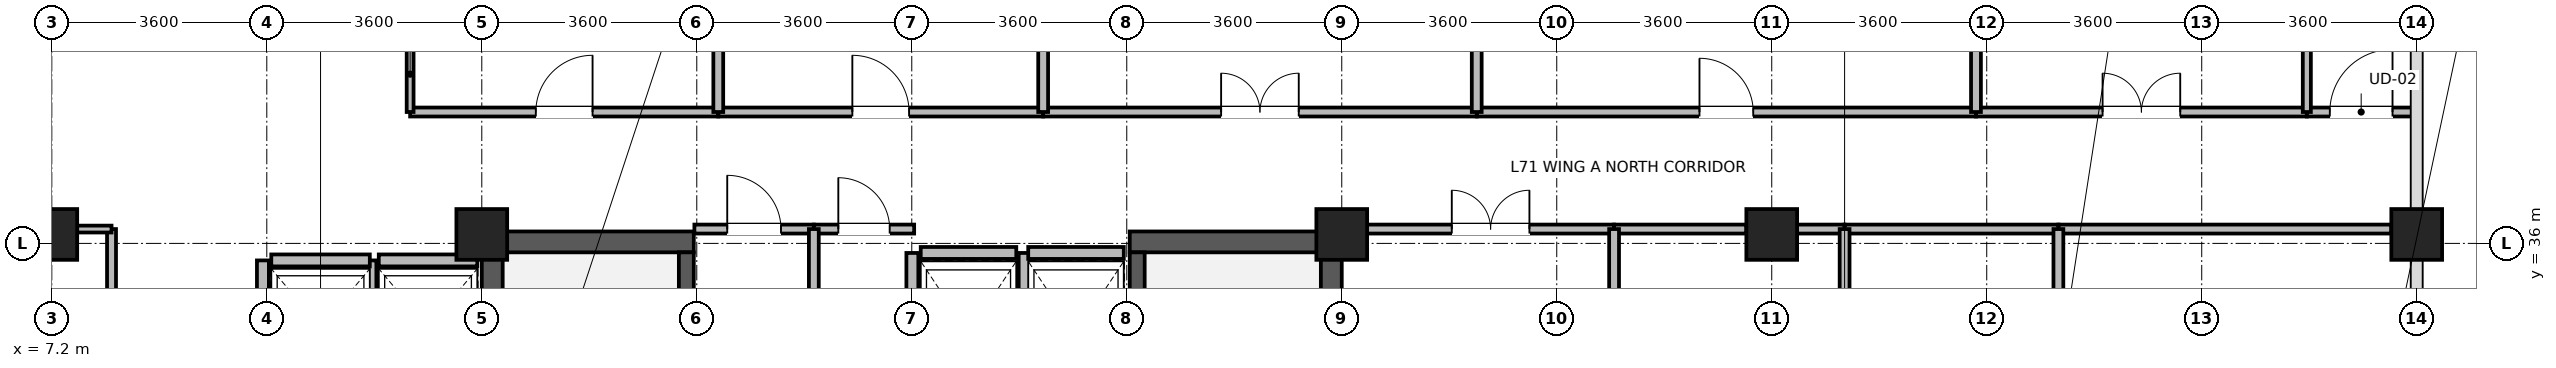
"""IFC4 building model, lengths in metres.
Left out: names, types, materials, properties, quantities, classifications, styles, units other than length and angle.
Written with IfcOpenShell. Run it as: python <this file> out.ifc"""

import sys

from ifc_helpers import new_model, si_unit, direction, frame, frame_2d, origin, origin_2d, place, context, subcontext, project, spatial, rectangle, extrude, source, transform, mapped, element, fill, save


model = new_model("IFC4")
c1 = context("Model", 3, precision=1e-05, world=origin(), true_north=direction((0.0, 1.0)))
c2 = subcontext(c1, "Body", "Model", "MODEL_VIEW")
j1 = project(units=[si_unit("LENGTHUNIT", "METRE"), si_unit("PLANEANGLEUNIT", "RADIAN")], contexts=[c1])
p1 = place(None, origin())
s1 = spatial("IfcSite", under=j1, at=p1, CompositionType="ELEMENT")
p2 = place(p1, origin())
s2 = spatial("IfcBuilding", under=s1, at=p2, CompositionType="ELEMENT")
p3 = place(p2, frame((0.0, 0.0, 275.8)))
s3 = spatial("IfcBuildingStorey", under=s2, at=p3, CompositionType="ELEMENT", Elevation=275.8)
for number, where, z_axis, x_axis in (
    (1, (14.575, 28.5, 0.0), (0.0, 0.0, 1.0), (0.0, 1.0, 0.0)),
    (2, (28.625, 28.5, 0.0), (0.0, 0.0, 1.0), (0.0, 1.0, 0.0)),
):
    element("IfcWall", number, at=place(p3, frame(where, z_axis=z_axis, x_axis=x_axis)), inside=s3, PredefinedType="SHEAR", context=c2, shape_type="SweptSolid", body=[
        extrude(rectangle(XDim=7.7, YDim=0.35, at=frame_2d((3.85, 0.0))), origin(), (0.0, 0.0, 1.0), 3.475),
    ])
for number, where, z_axis, x_axis in (
    (3, (14.75, 36.025, 0.0), (0.0, 0.0, 1.0), (1.0, 0.0, 0.0)),
    (4, (25.25, 36.025, 0.0), (0.0, 0.0, 1.0), (1.0, 0.0, 0.0)),
):
    element("IfcWall", number, at=place(p3, frame(where, z_axis=z_axis, x_axis=x_axis)), inside=s3, PredefinedType="SHEAR", context=c2, shape_type="SweptSolid", body=[
        extrude(rectangle(XDim=3.2, YDim=0.35, at=frame_2d((1.6, 0.0))), origin(), (0.0, 0.0, 1.0), 3.475),
    ])
p4 = place(p3, frame((17.825, 28.85, 0.0), z_axis=(0.0, 0.0, 1.0), x_axis=(0.0, 1.0, 0.0)))
e5 = element("IfcWall", 5, at=p4, inside=s3, PredefinedType="SHEAR", context=c2, shape_type="SweptSolid", body=[
    extrude(rectangle(XDim=7.0, YDim=0.25, at=frame_2d((3.5, 0.0))), origin(), (0.0, 0.0, 1.0), 3.475),
])
p5 = place(p4, frame((0.15, 0.0, 0.0)))
e6 = element("IfcOpeningElement", 6, at=p5, cuts=e5, PredefinedType="OPENING", context=c2, shape_type="SweptSolid", body=[
    extrude(rectangle(XDim=1.1, YDim=2.08, at=frame_2d((0.55, 1.04))), frame((0.0, 0.135, 0.0), z_axis=(0.0, -1.0, 0.0), x_axis=(1.0, 0.0, 0.0)), (0.0, 0.0, 1.0), 0.27),
])
p6 = place(p3, frame((25.375, 28.85, 0.0), z_axis=(0.0, 0.0, 1.0), x_axis=(0.0, 1.0, 0.0)))
e7 = element("IfcWall", 7, at=p6, inside=s3, PredefinedType="SHEAR", context=c2, shape_type="SweptSolid", body=[
    extrude(rectangle(XDim=7.0, YDim=0.25, at=frame_2d((3.5, 0.0))), origin(), (0.0, 0.0, 1.0), 3.475),
])
p7 = place(p6, frame((0.15, 0.0, 0.0)))
e8 = element("IfcOpeningElement", 8, at=p7, cuts=e7, PredefinedType="OPENING", context=c2, shape_type="SweptSolid", body=[
    extrude(rectangle(XDim=1.1, YDim=2.08, at=frame_2d((0.55, 1.04))), frame((0.0, 0.135, 0.0), z_axis=(0.0, -1.0, 0.0), x_axis=(1.0, 0.0, 0.0)), (0.0, 0.0, 1.0), 0.27),
])
m1 = source(origin(), c2, "Body", "SweptSolid", [
    extrude(rectangle(XDim=0.85, YDim=0.85, at=origin_2d()), origin(), (0.0, 0.0, 1.0), 3.7),
])
for number, where, z_axis, x_axis in (
    (9, (7.2, 36.15, 0.0), (0.0, 0.0, 1.0), (1.0, 0.0, 0.0)),
    (10, (14.4, 36.15, 0.0), (0.0, 0.0, 1.0), (1.0, 0.0, 0.0)),
    (11, (28.8, 36.15, 0.0), (0.0, 0.0, 1.0), (1.0, 0.0, 0.0)),
    (12, (36.0, 36.15, 0.0), (0.0, 0.0, 1.0), (1.0, 0.0, 0.0)),
    (13, (46.8, 36.15, 0.0), (0.0, 0.0, 1.0), (1.0, 0.0, 0.0)),
):
    element("IfcColumn", number, at=place(p3, frame(where, z_axis=z_axis, x_axis=x_axis)), inside=s3, PredefinedType="COLUMN", context=c2, shape_type="MappedRepresentation", body=[
        mapped(m1, transform((0.0, 0.0, 0.0), x_axis=(1.0, 0.0, 0.0), y_axis=(0.0, 1.0, 0.0), z_axis=(0.0, 0.0, 1.0), scale=1.0)),
    ])
p8 = place(p3, frame((12.675, 35.715, 0.0), z_axis=(0.0, 0.0, 1.0), x_axis=(1.0, 0.0, 0.0)))
e14 = element("IfcWall", 14, at=p8, inside=s3, PredefinedType="PARTITIONING", context=c2, shape_type="SweptSolid", body=[
    extrude(rectangle(XDim=1.65, YDim=0.2, at=frame_2d((0.825, 0.0))), origin(), (0.0, 0.0, 1.0), 3.455),
])
p9 = place(p3, frame((12.535, 33.485, 0.0), z_axis=(0.0, 0.0, 1.0), x_axis=(0.0, 1.0, 0.0)))
e15 = element("IfcWall", 15, at=p9, inside=s3, PredefinedType="PARTITIONING", context=c2, shape_type="SweptSolid", body=[
    extrude(rectangle(XDim=2.23, YDim=0.2, at=frame_2d((1.115, 0.0))), origin(), (0.0, 0.0, 1.0), 3.455),
])
p10 = place(p3, frame((10.875, 35.715, 0.0), z_axis=(0.0, 0.0, 1.0), x_axis=(1.0, 0.0, 0.0)))
e16 = element("IfcWall", 16, at=p10, inside=s3, PredefinedType="PARTITIONING", context=c2, shape_type="SweptSolid", body=[
    extrude(rectangle(XDim=1.65, YDim=0.2, at=frame_2d((0.825, 0.0))), origin(), (0.0, 0.0, 1.0), 3.455),
])
p11 = place(p3, frame((10.735, 33.485, 0.0), z_axis=(0.0, 0.0, 1.0), x_axis=(0.0, 1.0, 0.0)))
e17 = element("IfcWall", 17, at=p11, inside=s3, PredefinedType="PARTITIONING", context=c2, shape_type="SweptSolid", body=[
    extrude(rectangle(XDim=2.23, YDim=0.2, at=frame_2d((1.115, 0.0))), origin(), (0.0, 0.0, 1.0), 3.455),
])
p12 = place(p3, frame((21.75, 35.84, 0.0), z_axis=(0.0, 0.0, 1.0), x_axis=(1.0, 0.0, 0.0)))
e18 = element("IfcWall", 18, at=p12, inside=s3, PredefinedType="PARTITIONING", context=c2, shape_type="SweptSolid", body=[
    extrude(rectangle(XDim=1.6, YDim=0.2, at=frame_2d((0.8, 0.0))), origin(), (0.0, 0.0, 1.0), 2.555),
])
for number, where, z_axis, x_axis in (
    (19, (21.61, 33.16, 0.0), (0.0, 0.0, 1.0), (0.0, 1.0, 0.0)),
    (20, (23.49, 33.16, 0.0), (0.0, 0.0, 1.0), (0.0, 1.0, 0.0)),
):
    element("IfcWall", number, at=place(p3, frame(where, z_axis=z_axis, x_axis=x_axis)), inside=s3, PredefinedType="PARTITIONING", context=c2, shape_type="SweptSolid", body=[
        extrude(rectangle(XDim=2.68, YDim=0.2, at=frame_2d((1.34, 0.0))), origin(), (0.0, 0.0, 1.0), 3.455),
    ])
p13 = place(p3, frame((23.55, 35.84, 0.0), z_axis=(0.0, 0.0, 1.0), x_axis=(1.0, 0.0, 0.0)))
e21 = element("IfcWall", 21, at=p13, inside=s3, PredefinedType="PARTITIONING", context=c2, shape_type="SweptSolid", body=[
    extrude(rectangle(XDim=1.6, YDim=0.2, at=frame_2d((0.8, 0.0))), origin(), (0.0, 0.0, 1.0), 2.555),
])
p14 = place(p3, frame((31.06, 38.2, 0.0), z_axis=(0.0, 0.0, 1.0), x_axis=(1.0, 0.0, 0.0)))
e22 = element("IfcWall", 22, at=p14, inside=s3, PredefinedType="PARTITIONING", context=c2, shape_type="SweptSolid", body=[
    extrude(rectangle(XDim=8.36, YDim=0.15, at=frame_2d((4.18, 0.0))), origin(), (0.0, 0.0, 1.0), 3.455),
])
p15 = place(p14, frame((3.73, 0.0, 0.0)))
e23 = element("IfcOpeningElement", 23, at=p15, cuts=e22, PredefinedType="OPENING", context=c2, shape_type="SweptSolid", body=[
    extrude(rectangle(XDim=0.9, YDim=2.08, at=frame_2d((0.45, 1.04))), frame((0.0, 0.085, 0.0), z_axis=(0.0, -1.0, 0.0), x_axis=(1.0, 0.0, 0.0)), (0.0, 0.0, 1.0), 0.17),
])
p16 = place(p3, frame((23.8, 38.2, 0.0), z_axis=(0.0, 0.0, 1.0), x_axis=(1.0, 0.0, 0.0)))
e24 = element("IfcWall", 24, at=p16, inside=s3, PredefinedType="PARTITIONING", context=c2, shape_type="SweptSolid", body=[
    extrude(rectangle(XDim=7.26, YDim=0.15, at=frame_2d((3.63, 0.0))), origin(), (0.0, 0.0, 1.0), 3.455),
])
p17 = place(p16, frame((2.98, 0.0, 0.0)))
e25 = element("IfcOpeningElement", 25, at=p17, cuts=e24, PredefinedType="OPENING", context=c2, shape_type="SweptSolid", body=[
    extrude(rectangle(XDim=1.3, YDim=2.12, at=frame_2d((0.65, 1.06))), frame((0.0, 0.085, 0.0), z_axis=(0.0, -1.0, 0.0), x_axis=(1.0, 0.0, 0.0)), (0.0, 0.0, 1.0), 0.17),
])
p18 = place(p3, frame((40.8, 36.24, 0.0), z_axis=(0.0, 0.0, 1.0), x_axis=(1.0, 0.0, 0.0)))
e26 = element("IfcWall", 26, at=p18, inside=s3, PredefinedType="PARTITIONING", context=c2, shape_type="SweptSolid", body=[
    extrude(rectangle(XDim=5.575, YDim=0.15, at=frame_2d((2.788, 0.0))), origin(), (0.0, 0.0, 1.0), 2.905),
])
p19 = place(p3, frame((39.42, 38.2, 0.0), z_axis=(0.0, 0.0, 1.0), x_axis=(1.0, 0.0, 0.0)))
e27 = element("IfcWall", 27, at=p19, inside=s3, PredefinedType="PARTITIONING", context=c2, shape_type="SweptSolid", body=[
    extrude(rectangle(XDim=5.54, YDim=0.15, at=frame_2d((2.77, 0.0))), origin(), (0.0, 0.0, 1.0), 3.455),
])
p20 = place(p19, frame((2.12, 0.0, 0.0)))
e28 = element("IfcOpeningElement", 28, at=p20, cuts=e27, PredefinedType="OPENING", context=c2, shape_type="SweptSolid", body=[
    extrude(rectangle(XDim=1.3, YDim=2.12, at=frame_2d((0.65, 1.06))), frame((0.0, 0.085, 0.0), z_axis=(0.0, -1.0, 0.0), x_axis=(1.0, 0.0, 0.0)), (0.0, 0.0, 1.0), 0.17),
])
p21 = place(p3, frame((18.36, 38.2, 0.0), z_axis=(0.0, 0.0, 1.0), x_axis=(1.0, 0.0, 0.0)))
e29 = element("IfcWall", 29, at=p21, inside=s3, PredefinedType="PARTITIONING", context=c2, shape_type="SweptSolid", body=[
    extrude(rectangle(XDim=5.44, YDim=0.15, at=frame_2d((2.72, 0.0))), origin(), (0.0, 0.0, 1.0), 3.455),
])
p22 = place(p21, frame((2.245, 0.0, 0.0)))
e30 = element("IfcOpeningElement", 30, at=p22, cuts=e29, PredefinedType="OPENING", context=c2, shape_type="SweptSolid", body=[
    extrude(rectangle(XDim=0.95, YDim=2.1, at=frame_2d((0.475, 1.05))), frame((0.0, 0.085, 0.0), z_axis=(0.0, -1.0, 0.0), x_axis=(1.0, 0.0, 0.0)), (0.0, 0.0, 1.0), 0.17),
])
p23 = place(p3, frame((13.2, 38.2, 0.0), z_axis=(0.0, 0.0, 1.0), x_axis=(1.0, 0.0, 0.0)))
e31 = element("IfcWall", 31, at=p23, inside=s3, PredefinedType="PARTITIONING", context=c2, shape_type="SweptSolid", body=[
    extrude(rectangle(XDim=5.16, YDim=0.15, at=frame_2d((2.58, 0.0))), origin(), (0.0, 0.0, 1.0), 3.455),
])
p24 = place(p23, frame((2.105, 0.0, 0.0)))
e32 = element("IfcOpeningElement", 32, at=p24, cuts=e31, PredefinedType="OPENING", context=c2, shape_type="SweptSolid", body=[
    extrude(rectangle(XDim=0.95, YDim=2.1, at=frame_2d((0.475, 1.05))), frame((0.0, 0.085, 0.0), z_axis=(0.0, -1.0, 0.0), x_axis=(1.0, 0.0, 0.0)), (0.0, 0.0, 1.0), 0.17),
])
p25 = place(p3, frame((29.225, 36.24, 0.0), z_axis=(0.0, 0.0, 1.0), x_axis=(1.0, 0.0, 0.0)))
e33 = element("IfcWall", 33, at=p25, inside=s3, PredefinedType="PARTITIONING", context=c2, shape_type="SweptSolid", body=[
    extrude(rectangle(XDim=4.135, YDim=0.15, at=frame_2d((2.067, 0.0))), origin(), (0.0, 0.0, 1.0), 2.905),
])
p26 = place(p25, frame((1.417, 0.0, 0.0)))
e34 = element("IfcOpeningElement", 34, at=p26, cuts=e33, PredefinedType="OPENING", context=c2, shape_type="SweptSolid", body=[
    extrude(rectangle(XDim=1.3, YDim=2.12, at=frame_2d((0.65, 1.06))), frame((0.0, 0.085, 0.0), z_axis=(0.0, -1.0, 0.0), x_axis=(1.0, 0.0, 0.0)), (0.0, 0.0, 1.0), 0.17),
])
p27 = place(p3, frame((33.36, 36.24, 0.0), z_axis=(0.0, 0.0, 1.0), x_axis=(1.0, 0.0, 0.0)))
e35 = element("IfcWall", 35, at=p27, inside=s3, PredefinedType="PARTITIONING", context=c2, shape_type="SweptSolid", body=[
    extrude(rectangle(XDim=2.215, YDim=0.15, at=frame_2d((1.107, 0.0))), origin(), (0.0, 0.0, 1.0), 2.905),
])
p28 = place(p3, frame((36.425, 36.24, 0.0), z_axis=(0.0, 0.0, 1.0), x_axis=(1.0, 0.0, 0.0)))
e36 = element("IfcWall", 36, at=p28, inside=s3, PredefinedType="PARTITIONING", context=c2, shape_type="SweptSolid", body=[
    extrude(rectangle(XDim=0.795, YDim=0.15, at=frame_2d((0.397, 0.0))), origin(), (0.0, 0.0, 1.0), 2.905),
])
p29 = place(p3, frame((8.2, 32.4, 0.0), z_axis=(0.0, 0.0, 1.0), x_axis=(0.0, 1.0, 0.0)))
e37 = element("IfcWall", 37, at=p29, inside=s3, PredefinedType="PARTITIONING", context=c2, shape_type="SweptSolid", body=[
    extrude(rectangle(XDim=3.84, YDim=0.15, at=frame_2d((1.92, 0.0))), origin(), (0.0, 0.0, 1.0), 3.455),
])
p30 = place(p29, frame((1.445, 0.0, 0.0)))
e38 = element("IfcOpeningElement", 38, at=p30, cuts=e37, PredefinedType="OPENING", context=c2, shape_type="SweptSolid", body=[
    extrude(rectangle(XDim=0.95, YDim=2.1, at=frame_2d((0.475, 1.05))), frame((0.0, 0.085, 0.0), z_axis=(0.0, -1.0, 0.0), x_axis=(1.0, 0.0, 0.0)), (0.0, 0.0, 1.0), 0.17),
])
p31 = place(p3, frame((37.22, 36.24, 0.0), z_axis=(0.0, 0.0, 1.0), x_axis=(1.0, 0.0, 0.0)))
e39 = element("IfcWall", 39, at=p31, inside=s3, PredefinedType="PARTITIONING", context=c2, shape_type="SweptSolid", body=[
    extrude(rectangle(XDim=3.58, YDim=0.15, at=frame_2d((1.79, 0.0))), origin(), (0.0, 0.0, 1.0), 2.905),
])
p32 = place(p3, frame((17.96, 36.24, 0.0), z_axis=(0.0, 0.0, 1.0), x_axis=(1.0, 0.0, 0.0)))
e40 = element("IfcWall", 40, at=p32, inside=s3, PredefinedType="PARTITIONING", context=c2, shape_type="SweptSolid", body=[
    extrude(rectangle(XDim=2.0, YDim=0.15, at=frame_2d((1.0, 0.0))), origin(), (0.0, 0.0, 1.0), 2.555),
])
p33 = place(p32, frame((0.55, 0.0, 0.0)))
e41 = element("IfcOpeningElement", 41, at=p33, cuts=e40, PredefinedType="OPENING", context=c2, shape_type="SweptSolid", body=[
    extrude(rectangle(XDim=0.9, YDim=2.08, at=frame_2d((0.45, 1.04))), frame((0.0, 0.085, 0.0), z_axis=(0.0, -1.0, 0.0), x_axis=(1.0, 0.0, 0.0)), (0.0, 0.0, 1.0), 0.17),
])
p34 = place(p3, frame((44.96, 38.2, 0.0), z_axis=(0.0, 0.0, 1.0), x_axis=(1.0, 0.0, 0.0)))
e42 = element("IfcWall", 42, at=p34, inside=s3, PredefinedType="PARTITIONING", context=c2, shape_type="SweptSolid", body=[
    extrude(rectangle(XDim=1.82, YDim=0.15, at=frame_2d((0.91, 0.0))), origin(), (0.0, 0.0, 1.0), 3.455),
])
p35 = place(p34, frame((0.385, 0.0, 0.0)))
e43 = element("IfcOpeningElement", 43, at=p35, cuts=e42, PredefinedType="OPENING", context=c2, shape_type="SweptSolid", body=[
    extrude(rectangle(XDim=1.05, YDim=2.12, at=frame_2d((0.525, 1.06))), frame((0.0, 0.085, 0.0), z_axis=(0.0, -1.0, 0.0), x_axis=(1.0, 0.0, 0.0)), (0.0, 0.0, 1.0), 0.17),
])
p36 = place(p3, frame((19.96, 36.24, 0.0), z_axis=(0.0, 0.0, 1.0), x_axis=(1.0, 0.0, 0.0)))
e44 = element("IfcWall", 44, at=p36, inside=s3, PredefinedType="PARTITIONING", context=c2, shape_type="SweptSolid", body=[
    extrude(rectangle(XDim=1.68, YDim=0.15, at=frame_2d((0.84, 0.0))), origin(), (0.0, 0.0, 1.0), 2.555),
])
p37 = place(p36, frame((0.41, 0.0, 0.0)))
e45 = element("IfcOpeningElement", 45, at=p37, cuts=e44, PredefinedType="OPENING", context=c2, shape_type="SweptSolid", body=[
    extrude(rectangle(XDim=0.86, YDim=2.02, at=frame_2d((0.43, 1.01))), frame((0.0, 0.085, 0.0), z_axis=(0.0, -1.0, 0.0), x_axis=(1.0, 0.0, 0.0)), (0.0, 0.0, 1.0), 0.17),
])
for number, where, z_axis, x_axis in (
    (46, (37.22, 28.56, 0.0), (0.0, 0.0, 1.0), (0.0, 1.0, 0.0)),
    (47, (40.8, 28.56, 0.0), (0.0, 0.0, 1.0), (0.0, 1.0, 0.0)),
):
    element("IfcWall", number, at=place(p3, frame(where, z_axis=z_axis, x_axis=x_axis)), inside=s3, PredefinedType="PARTITIONING", context=c2, shape_type="SweptSolid", body=[
        extrude(rectangle(XDim=7.68, YDim=0.165, at=frame_2d((3.84, 0.0))), origin(), (0.0, 0.0, 1.0), 3.455),
    ])
p38 = place(p3, frame((13.2, 38.2, 0.0), z_axis=(0.0, 0.0, 1.0), x_axis=(0.0, 1.0, 0.0)))
e48 = element("IfcWall", 48, at=p38, inside=s3, PredefinedType="PARTITIONING", context=c2, shape_type="SweptSolid", body=[
    extrude(rectangle(XDim=1.268, YDim=0.115, at=frame_2d((0.634, 0.0))), origin(), (0.0, 0.0, 1.0), 3.455),
])
for number, where, z_axis, x_axis in (
    (49, (18.36, 38.2, 0.0), (0.0, 0.0, 1.0), (0.0, 1.0, 0.0)),
    (50, (23.8, 38.2, 0.0), (0.0, 0.0, 1.0), (0.0, 1.0, 0.0)),
    (51, (31.06, 38.2, 0.0), (0.0, 0.0, 1.0), (0.0, 1.0, 0.0)),
    (52, (39.42, 38.2, 0.0), (0.0, 0.0, 1.0), (0.0, 1.0, 0.0)),
):
    element("IfcWall", number, at=place(p3, frame(where, z_axis=z_axis, x_axis=x_axis)), inside=s3, PredefinedType="PARTITIONING", context=c2, shape_type="SweptSolid", body=[
        extrude(rectangle(XDim=4.868, YDim=0.165, at=frame_2d((2.434, 0.0))), origin(), (0.0, 0.0, 1.0), 3.455),
    ])
p39 = place(p3, frame((44.96, 38.2, 0.0), z_axis=(0.0, 0.0, 1.0), x_axis=(0.0, 1.0, 0.0)))
e53 = element("IfcWall", 53, at=p39, inside=s3, PredefinedType="PARTITIONING", context=c2, shape_type="SweptSolid", body=[
    extrude(rectangle(XDim=4.868, YDim=0.135, at=frame_2d((2.434, 0.0))), origin(), (0.0, 0.0, 1.0), 3.455),
])
p40 = place(p3, frame((7.625, 36.24, 0.0), z_axis=(0.0, 0.0, 1.0), x_axis=(1.0, 0.0, 0.0)))
e54 = element("IfcWall", 54, at=p40, inside=s3, PredefinedType="PARTITIONING", context=c2, shape_type="SweptSolid", body=[
    extrude(rectangle(XDim=0.575, YDim=0.115, at=frame_2d((0.288, 0.0))), origin(), (0.0, 0.0, 1.0), 2.905),
])
p41 = place(p3, frame((33.36, 32.4, 0.0), z_axis=(0.0, 0.0, 1.0), x_axis=(0.0, 1.0, 0.0)))
e55 = element("IfcWall", 55, at=p41, inside=s3, PredefinedType="PARTITIONING", context=c2, shape_type="SweptSolid", body=[
    extrude(rectangle(XDim=3.84, YDim=0.165, at=frame_2d((1.92, 0.0))), origin(), (0.0, 0.0, 1.0), 3.455),
])
p42 = place(p3, frame((19.96, 33.36, 0.0), z_axis=(0.0, 0.0, 1.0), x_axis=(0.0, 1.0, 0.0)))
e56 = element("IfcWall", 56, at=p42, inside=s3, PredefinedType="PARTITIONING", context=c2, shape_type="SweptSolid", body=[
    extrude(rectangle(XDim=2.88, YDim=0.165, at=frame_2d((1.44, 0.0))), origin(), (0.0, 0.0, 1.0), 3.455),
])
p43 = place(p15, origin())
e57 = element("IfcDoor", 57, at=p43, inside=s3, OperationType="SINGLE_SWING_LEFT", PredefinedType="DOOR", context=c2, shape_type="SweptSolid", body=[
    extrude(rectangle(XDim=0.9, YDim=2.08, at=frame_2d((0.45, 1.04))), frame((0.0, 0.025, 0.0), z_axis=(0.0, -1.0, 0.0), x_axis=(1.0, 0.0, 0.0)), (0.0, 0.0, 1.0), 0.05),
])
fill(e23, e57)
p44 = place(p17, origin())
e58 = element("IfcDoor", 58, at=p44, inside=s3, OperationType="DOUBLE_DOOR_SINGLE_SWING", PredefinedType="DOOR", context=c2, shape_type="SweptSolid", body=[
    extrude(rectangle(XDim=1.3, YDim=2.12, at=frame_2d((0.65, 1.06))), frame((0.0, 0.025, 0.0), z_axis=(0.0, -1.0, 0.0), x_axis=(1.0, 0.0, 0.0)), (0.0, 0.0, 1.0), 0.05),
])
fill(e25, e58)
p45 = place(p20, origin())
e59 = element("IfcDoor", 59, at=p45, inside=s3, OperationType="DOUBLE_DOOR_SINGLE_SWING", PredefinedType="DOOR", context=c2, shape_type="SweptSolid", body=[
    extrude(rectangle(XDim=1.3, YDim=2.12, at=frame_2d((0.65, 1.06))), frame((0.0, 0.025, 0.0), z_axis=(0.0, -1.0, 0.0), x_axis=(1.0, 0.0, 0.0)), (0.0, 0.0, 1.0), 0.05),
])
fill(e28, e59)
p46 = place(p22, origin())
e60 = element("IfcDoor", 60, at=p46, inside=s3, OperationType="SINGLE_SWING_LEFT", PredefinedType="DOOR", context=c2, shape_type="SweptSolid", body=[
    extrude(rectangle(XDim=0.95, YDim=2.1, at=frame_2d((0.475, 1.05))), frame((0.0, 0.025, 0.0), z_axis=(0.0, -1.0, 0.0), x_axis=(1.0, 0.0, 0.0)), (0.0, 0.0, 1.0), 0.05),
])
fill(e30, e60)
p47 = place(p24, origin())
e61 = element("IfcDoor", 61, at=p47, inside=s3, OperationType="SINGLE_SWING_RIGHT", PredefinedType="DOOR", context=c2, shape_type="SweptSolid", body=[
    extrude(rectangle(XDim=0.95, YDim=2.1, at=frame_2d((0.475, 1.05))), frame((0.0, 0.025, 0.0), z_axis=(0.0, -1.0, 0.0), x_axis=(1.0, 0.0, 0.0)), (0.0, 0.0, 1.0), 0.05),
])
fill(e32, e61)
p48 = place(p26, origin())
e62 = element("IfcDoor", 62, at=p48, inside=s3, OperationType="DOUBLE_DOOR_SINGLE_SWING", PredefinedType="DOOR", context=c2, shape_type="SweptSolid", body=[
    extrude(rectangle(XDim=1.3, YDim=2.12, at=frame_2d((0.65, 1.06))), frame((0.0, 0.025, 0.0), z_axis=(0.0, -1.0, 0.0), x_axis=(1.0, 0.0, 0.0)), (0.0, 0.0, 1.0), 0.05),
])
fill(e34, e62)
p49 = place(p33, origin())
e63 = element("IfcDoor", 63, at=p49, inside=s3, OperationType="SINGLE_SWING_LEFT", PredefinedType="DOOR", context=c2, shape_type="SweptSolid", body=[
    extrude(rectangle(XDim=0.9, YDim=2.08, at=frame_2d((0.45, 1.04))), frame((0.0, 0.025, 0.0), z_axis=(0.0, -1.0, 0.0), x_axis=(1.0, 0.0, 0.0)), (0.0, 0.0, 1.0), 0.05),
])
fill(e41, e63)
p50 = place(p35, origin())
e64 = element("IfcDoor", 64, at=p50, inside=s3, OperationType="SINGLE_SWING_RIGHT", PredefinedType="DOOR", context=c2, shape_type="SweptSolid", body=[
    extrude(rectangle(XDim=1.05, YDim=2.12, at=frame_2d((0.525, 1.06))), frame((0.0, 0.025, 0.0), z_axis=(0.0, -1.0, 0.0), x_axis=(1.0, 0.0, 0.0)), (0.0, 0.0, 1.0), 0.05),
])
fill(e43, e64)
p51 = place(p37, origin())
e65 = element("IfcDoor", 65, at=p51, inside=s3, OperationType="SINGLE_SWING_LEFT", PredefinedType="DOOR", context=c2, shape_type="SweptSolid", body=[
    extrude(rectangle(XDim=0.86, YDim=2.02, at=frame_2d((0.43, 1.01))), frame((0.0, 0.025, 0.0), z_axis=(0.0, -1.0, 0.0), x_axis=(1.0, 0.0, 0.0)), (0.0, 0.0, 1.0), 0.05),
])
fill(e45, e65)
save(model, sys.argv[1])
